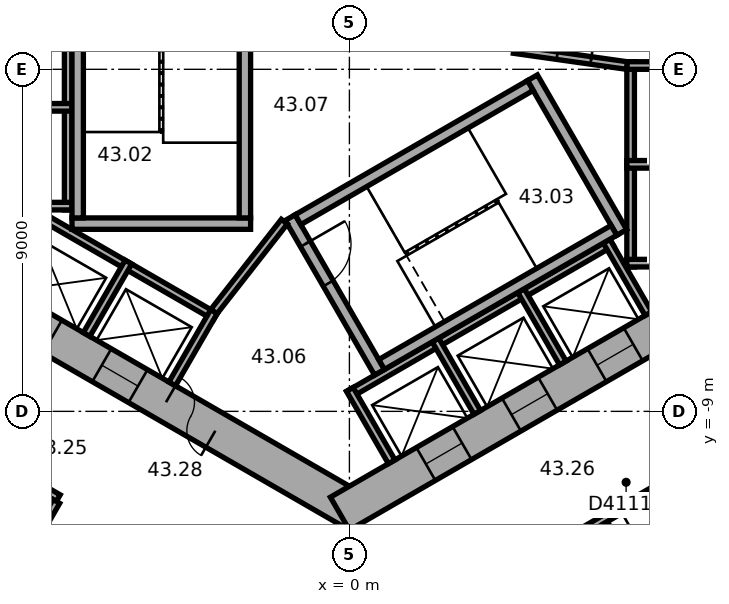
"""IFC4 building model, lengths in metres.
Left out: names, types, materials, properties, quantities, classifications, styles, units other than length and angle.
Written with IfcOpenShell. Run it as: python <this file> out.ifc"""

import sys

from ifc_helpers import new_model, si_unit, direction, frame, frame_2d, origin, place, context, subcontext, project, spatial, rectangle, extrude, element, fill, save


model = new_model("IFC4")
c1 = context("Model", 3, precision=1e-05, world=origin(), true_north=direction((0.0, 1.0)))
c2 = subcontext(c1, "Body", "Model", "MODEL_VIEW")
j1 = project(units=[si_unit("LENGTHUNIT", "METRE"), si_unit("PLANEANGLEUNIT", "RADIAN")], contexts=[c1])
p1 = place(None, origin())
s1 = spatial("IfcSite", under=j1, at=p1, CompositionType="ELEMENT")
p2 = place(p1, origin())
s2 = spatial("IfcBuilding", under=s1, at=p2, CompositionType="ELEMENT")
p3 = place(p2, frame((0.0, 0.0, 176.2)))
s3 = spatial("IfcBuildingStorey", under=s2, at=p3, CompositionType="ELEMENT", Elevation=176.2)
p4 = place(p3, frame((-10.25, -5.629, 0.0), z_axis=(0.0, 0.0, 1.0), x_axis=(0.866022616891, -0.50000482701, 0.0)))
e1 = element("IfcWall", 1, at=p4, inside=s3, PredefinedType="SHEAR", context=c2, shape_type="SweptSolid", body=[
    extrude(rectangle(XDim=12.125, YDim=1.0, at=frame_2d((6.062, 0.0))), origin(), (0.0, 0.0, 1.0), 3.7),
])
p5 = place(p4, frame((6.262, 0.0, 0.0)))
e2 = element("IfcOpeningElement", 2, at=p5, cuts=e1, PredefinedType="OPENING", context=c2, shape_type="SweptSolid", body=[
    extrude(rectangle(XDim=1.5, YDim=2.1, at=frame_2d((0.75, 1.05))), frame((0.0, 0.51, 0.0), z_axis=(0.0, -1.0, 0.0), x_axis=(1.0, 0.0, 0.0)), (0.0, 0.0, 1.0), 1.02),
])
p6 = place(p4, frame((1.712, 0.0, 0.0)))
e3 = element("IfcOpeningElement", 3, at=p6, cuts=e1, PredefinedType="OPENING", context=c2, shape_type="SweptSolid", body=[
    extrude(rectangle(XDim=1.1, YDim=2.1, at=frame_2d((0.55, 1.05))), frame((0.0, 0.51, 0.0), z_axis=(0.0, -1.0, 0.0), x_axis=(1.0, 0.0, 0.0)), (0.0, 0.0, 1.0), 1.02),
])
p7 = place(p4, frame((4.312, 0.0, 0.0)))
e4 = element("IfcOpeningElement", 4, at=p7, cuts=e1, PredefinedType="OPENING", context=c2, shape_type="SweptSolid", body=[
    extrude(rectangle(XDim=1.1, YDim=2.1, at=frame_2d((0.55, 1.05))), frame((0.0, 0.51, 0.0), z_axis=(0.0, -1.0, 0.0), x_axis=(1.0, 0.0, 0.0)), (0.0, 0.0, 1.0), 1.02),
])
p8 = place(p3, frame((-0.25, -11.691, 0.0), z_axis=(0.0, 0.0, 1.0), x_axis=(0.866022616891, 0.50000482701, 0.0)))
e5 = element("IfcWall", 5, at=p8, inside=s3, PredefinedType="SHEAR", context=c2, shape_type="SweptSolid", body=[
    extrude(rectangle(XDim=12.125, YDim=1.0, at=frame_2d((6.062, 0.0))), origin(), (0.0, 0.0, 1.0), 3.7),
])
p9 = place(p8, frame((2.612, 0.0, 0.0)))
e6 = element("IfcOpeningElement", 6, at=p9, cuts=e5, PredefinedType="OPENING", context=c2, shape_type="SweptSolid", body=[
    extrude(rectangle(XDim=1.1, YDim=2.1, at=frame_2d((0.55, 1.05))), frame((0.0, 0.51, 0.0), z_axis=(0.0, -1.0, 0.0), x_axis=(1.0, 0.0, 0.0)), (0.0, 0.0, 1.0), 1.02),
])
p10 = place(p8, frame((5.212, 0.0, 0.0)))
e7 = element("IfcOpeningElement", 7, at=p10, cuts=e5, PredefinedType="OPENING", context=c2, shape_type="SweptSolid", body=[
    extrude(rectangle(XDim=1.1, YDim=2.1, at=frame_2d((0.55, 1.05))), frame((0.0, 0.51, 0.0), z_axis=(0.0, -1.0, 0.0), x_axis=(1.0, 0.0, 0.0)), (0.0, 0.0, 1.0), 1.02),
])
p11 = place(p8, frame((7.812, 0.0, 0.0)))
e8 = element("IfcOpeningElement", 8, at=p11, cuts=e5, PredefinedType="OPENING", context=c2, shape_type="SweptSolid", body=[
    extrude(rectangle(XDim=1.1, YDim=2.1, at=frame_2d((0.55, 1.05))), frame((0.0, 0.51, 0.0), z_axis=(0.0, -1.0, 0.0), x_axis=(1.0, 0.0, 0.0)), (0.0, 0.0, 1.0), 1.02),
])
p12 = place(p3, frame((7.4, -5.2, 0.0), z_axis=(0.0, 0.0, 1.0), x_axis=(0.0, 1.0, 0.0)))
e9 = element("IfcWall", 9, at=p12, inside=s3, PredefinedType="PARTITIONING", context=c2, shape_type="SweptSolid", body=[
    extrude(rectangle(XDim=5.4, YDim=0.2, at=frame_2d((2.7, 0.0))), origin(), (0.0, 0.0, 1.0), 3.42),
])
for number, where, z_axis, x_axis in (
    (10, (7.3, -5.1, 0.0), (0.0, 0.0, 1.0), (1.0, 0.0, 0.0)),
    (11, (7.3, -2.5, 0.0), (0.0, 0.0, 1.0), (1.0, 0.0, 0.0)),
    (12, (7.3, 0.1, 0.0), (0.0, 0.0, 1.0), (1.0, 0.0, 0.0)),
):
    element("IfcWall", number, at=place(p3, frame(where, z_axis=z_axis, x_axis=x_axis)), inside=s3, PredefinedType="PARTITIONING", context=c2, shape_type="SweptSolid", body=[
        extrude(rectangle(XDim=2.2, YDim=0.2, at=frame_2d((1.1, 0.0))), origin(), (0.0, 0.0, 1.0), 3.42),
    ])
p13 = place(p3, frame((-7.4, 4.3, 0.0), z_axis=(0.0, 0.0, 1.0), x_axis=(0.0, -1.0, 0.0)))
e13 = element("IfcWall", 13, at=p13, inside=s3, PredefinedType="PARTITIONING", context=c2, shape_type="SweptSolid", body=[
    extrude(rectangle(XDim=8.0, YDim=0.2, at=frame_2d((4.0, 0.0))), origin(), (0.0, 0.0, 1.0), 3.42),
])
for number, where, z_axis, x_axis in (
    (14, (-7.3, -1.0, 0.0), (0.0, 0.0, 1.0), (-1.0, 0.0, 0.0)),
    (15, (-7.3, -3.6, 0.0), (0.0, 0.0, 1.0), (-1.0, 0.0, 0.0)),
):
    element("IfcWall", number, at=place(p3, frame(where, z_axis=z_axis, x_axis=x_axis)), inside=s3, PredefinedType="PARTITIONING", context=c2, shape_type="SweptSolid", body=[
        extrude(rectangle(XDim=2.2, YDim=0.2, at=frame_2d((1.1, 0.0))), origin(), (0.0, 0.0, 1.0), 3.42),
    ])
p14 = place(p3, frame((-8.203, -3.809, 0.0), z_axis=(0.0, 0.0, 1.0), x_axis=(0.866028230842, -0.499995103361, 0.0)))
e16 = element("IfcWall", 16, at=p14, inside=s3, PredefinedType="PARTITIONING", context=c2, shape_type="SweptSolid", body=[
    extrude(rectangle(XDim=5.4, YDim=0.2, at=frame_2d((2.7, 0.0))), origin(), (0.0, 0.0, 1.0), 3.42),
])
p15 = place(p3, frame((-5.815, -5.072, 0.0), z_axis=(0.0, 0.0, 1.0), x_axis=(-0.499946605688, -0.86605622881, 0.0)))
e17 = element("IfcWall", 17, at=p15, inside=s3, PredefinedType="PARTITIONING", context=c2, shape_type="SweptSolid", body=[
    extrude(rectangle(XDim=2.2, YDim=0.2, at=frame_2d((1.1, 0.0))), origin(), (0.0, 0.0, 1.0), 3.42),
])
p16 = place(p3, frame((-3.563, -6.372, 0.0), z_axis=(0.0, 0.0, 1.0), x_axis=(-0.499994660107, -0.866028486751, 0.0)))
e18 = element("IfcWall", 18, at=p16, inside=s3, PredefinedType="PARTITIONING", context=c2, shape_type="SweptSolid", body=[
    extrude(rectangle(XDim=2.2, YDim=0.2, at=frame_2d((1.1, 0.0))), origin(), (0.0, 0.0, 1.0), 3.42),
])
p17 = place(p3, frame((-0.024, -8.559, 0.0), z_axis=(0.0, 0.0, 1.0), x_axis=(0.866026010844, 0.49999894854, 0.0)))
e19 = element("IfcWall", 19, at=p17, inside=s3, PredefinedType="PARTITIONING", context=c2, shape_type="SweptSolid", body=[
    extrude(rectangle(XDim=8.0, YDim=0.2, at=frame_2d((4.0, 0.0))), origin(), (0.0, 0.0, 1.0), 3.42),
])
for number, where, z_axis, x_axis in (
    (20, (0.013, -8.422, 0.0), (0.0, 0.0, 1.0), (0.5, -0.866, 0.0)),
    (21, (2.264, -7.122, 0.0), (0.0, 0.0, 1.0), (0.5, -0.866, 0.0)),
    (22, (4.516, -5.822, 0.0), (0.0, 0.0, 1.0), (0.5, -0.866, 0.0)),
    (23, (6.768, -4.522, 0.0), (0.0, 0.0, 1.0), (0.5, -0.866, 0.0)),
):
    element("IfcWall", number, at=place(p3, frame(where, z_axis=z_axis, x_axis=x_axis)), inside=s3, PredefinedType="PARTITIONING", context=c2, shape_type="SweptSolid", body=[
        extrude(rectangle(XDim=2.2, YDim=0.2, at=frame_2d((1.1, 0.0))), origin(), (0.0, 0.0, 1.0), 3.42),
    ])
p18 = place(p3, frame((-2.6, -4.06, 0.0), z_axis=(0.0, 0.0, 1.0), x_axis=(-1.0, 0.0, 0.0)))
e24 = element("IfcWall", 24, at=p18, inside=s3, PredefinedType="SHEAR", context=c2, shape_type="SweptSolid", body=[
    extrude(rectangle(XDim=4.7, YDim=0.3, at=frame_2d((2.35, 0.0))), origin(), (0.0, 0.0, 1.0), 3.42),
])
for number, where, z_axis, x_axis in (
    (25, (-2.75, 3.15, 0.0), (0.0, 0.0, 1.0), (0.0, -1.0, 0.0)),
    (26, (-7.15, 3.15, 0.0), (0.0, 0.0, 1.0), (0.0, -1.0, 0.0)),
):
    element("IfcWall", number, at=place(p3, frame(where, z_axis=z_axis, x_axis=x_axis)), inside=s3, PredefinedType="SHEAR", context=c2, shape_type="SweptSolid", body=[
        extrude(rectangle(XDim=7.06, YDim=0.3, at=frame_2d((3.53, 0.0))), origin(), (0.0, 0.0, 1.0), 3.42),
    ])
p19 = place(p3, frame((-1.558, -3.902, 0.0), z_axis=(0.0, 0.0, 1.0), x_axis=(0.499977259774, -0.866038532462, 0.0)))
e27 = element("IfcWall", 27, at=p19, inside=s3, PredefinedType="SHEAR", context=c2, shape_type="SweptSolid", body=[
    extrude(rectangle(XDim=4.7, YDim=0.3, at=frame_2d((2.35, 0.0))), origin(), (0.0, 0.0, 1.0), 3.42),
])
p20 = place(p19, frame((0.8, 0.0, 0.0)))
e28 = element("IfcOpeningElement", 28, at=p20, cuts=e27, PredefinedType="OPENING", context=c2, shape_type="SweptSolid", body=[
    extrude(rectangle(XDim=1.2, YDim=2.1, at=frame_2d((0.6, 1.05))), frame((0.0, 0.16, 0.0), z_axis=(0.0, -1.0, 0.0), x_axis=(1.0, 0.0, 0.0)), (0.0, 0.0, 1.0), 0.32),
])
p21 = place(p3, frame((4.816, -0.222, 0.0), z_axis=(0.0, 0.0, 1.0), x_axis=(0.499977259774, -0.866038532462, 0.0)))
e29 = element("IfcWall", 29, at=p21, inside=s3, PredefinedType="SHEAR", context=c2, shape_type="SweptSolid", body=[
    extrude(rectangle(XDim=4.7, YDim=0.3, at=frame_2d((2.35, 0.0))), origin(), (0.0, 0.0, 1.0), 3.42),
])
for number, where, z_axis, x_axis in (
    (30, (-1.353, -3.957, 0.0), (0.0, 0.0, 1.0), (0.866, 0.5, 0.0)),
    (31, (0.847, -7.767, 0.0), (0.0, 0.0, 1.0), (0.866, 0.5, 0.0)),
):
    element("IfcWall", number, at=place(p3, frame(where, z_axis=z_axis, x_axis=x_axis)), inside=s3, PredefinedType="SHEAR", context=c2, shape_type="SweptSolid", body=[
        extrude(rectangle(XDim=7.06, YDim=0.3, at=frame_2d((3.53, 0.0))), origin(), (0.0, 0.0, 1.0), 3.42),
    ])
p22 = place(p3, frame((4.327, 0.521, 0.0), z_axis=(0.0, 0.0, 1.0), x_axis=(0.990124376366, -0.14019172346, 0.0)))
e32 = element("IfcWall", 32, at=p22, inside=s3, PredefinedType="PARTITIONING", context=c2, shape_type="SweptSolid", body=[
    extrude(rectangle(XDim=3.002, YDim=0.2, at=frame_2d((1.501, 0.0))), origin(), (0.0, 0.0, 1.0), 3.42),
])
p23 = place(p22, frame((1.15, 0.0, 0.0)))
e33 = element("IfcOpeningElement", 33, at=p23, cuts=e32, PredefinedType="OPENING", context=c2, shape_type="SweptSolid", body=[
    extrude(rectangle(XDim=0.9, YDim=2.1, at=frame_2d((0.45, 1.05))), frame((0.0, 0.11, 0.0), z_axis=(0.0, -1.0, 0.0), x_axis=(1.0, 0.0, 0.0)), (0.0, 0.0, 1.0), 0.22),
])
p24 = place(p3, frame((-1.712, -4.008, 0.0), z_axis=(0.0, 0.0, 1.0), x_axis=(-0.616549420702, -0.787316208287, 0.0)))
e34 = element("IfcWall", 34, at=p24, inside=s3, PredefinedType="PARTITIONING", context=c2, shape_type="SweptSolid", body=[
    extrude(rectangle(XDim=3.002, YDim=0.2, at=frame_2d((1.501, 0.0))), origin(), (0.0, 0.0, 1.0), 3.42),
])
p25 = place(p3, frame((-11.435, -9.103, 0.0), z_axis=(0.0, 0.0, 1.0), x_axis=(0.866007399799, -0.500031182522, 0.0)))
e35 = element("IfcWall", 35, at=p25, inside=s3, PredefinedType="PARTITIONING", context=c2, shape_type="SweptSolid", body=[
    extrude(rectangle(XDim=4.358, YDim=0.2, at=frame_2d((2.179, 0.0))), origin(), (0.0, 0.0, 1.0), 3.42),
])
p26 = place(p3, frame((-11.235, -17.474, 0.0), z_axis=(0.0, 0.0, 1.0), x_axis=(0.500009260695, 0.866020057054, 0.0)))
e36 = element("IfcWall", 36, at=p26, inside=s3, PredefinedType="PARTITIONING", context=c2, shape_type="SweptSolid", body=[
    extrude(rectangle(XDim=7.049, YDim=0.2, at=frame_2d((3.524, 0.0))), origin(), (0.0, 0.0, 1.0), 2.87),
])
p27 = place(p26, frame((3.024, 0.0, 0.0)))
e37 = element("IfcOpeningElement", 37, at=p27, cuts=e36, PredefinedType="OPENING", context=c2, shape_type="SweptSolid", body=[
    extrude(rectangle(XDim=1.0, YDim=2.1, at=frame_2d((0.5, 1.05))), frame((0.0, 0.11, 0.0), z_axis=(0.0, -1.0, 0.0), x_axis=(1.0, 0.0, 0.0)), (0.0, 0.0, 1.0), 0.22),
])
p28 = place(p3, frame((4.782, -12.944, 0.0), z_axis=(0.0, 0.0, 1.0), x_axis=(0.866022506829, 0.50000501764, 0.0)))
e38 = element("IfcWall", 38, at=p28, inside=s3, PredefinedType="PARTITIONING", context=c2, shape_type="SweptSolid", body=[
    extrude(rectangle(XDim=6.432, YDim=0.2, at=frame_2d((3.216, 0.0))), origin(), (0.0, 0.0, 1.0), 3.42),
])
p29 = place(p28, frame((2.704, 0.0, 0.0)))
e39 = element("IfcOpeningElement", 39, at=p29, cuts=e38, PredefinedType="OPENING", context=c2, shape_type="SweptSolid", body=[
    extrude(rectangle(XDim=1.0, YDim=2.1, at=frame_2d((0.5, 1.05))), frame((0.0, 0.11, 0.0), z_axis=(0.0, -1.0, 0.0), x_axis=(1.0, 0.0, 0.0)), (0.0, 0.0, 1.0), 0.22),
])
p30 = place(p28, frame((4.795, 0.0, 0.0)))
e40 = element("IfcOpeningElement", 40, at=p30, cuts=e38, PredefinedType="OPENING", context=c2, shape_type="SweptSolid", body=[
    extrude(rectangle(XDim=1.0, YDim=2.1, at=frame_2d((0.5, 1.05))), frame((0.0, 0.11, 0.0), z_axis=(0.0, -1.0, 0.0), x_axis=(1.0, 0.0, 0.0)), (0.0, 0.0, 1.0), 0.22),
])
p31 = place(p3, frame((6.737, -11.931, 0.0), z_axis=(0.0, 0.0, 1.0), x_axis=(0.500004234368, -0.866022959057, 0.0)))
e41 = element("IfcWall", 41, at=p31, inside=s3, PredefinedType="PARTITIONING", context=c2, shape_type="SweptSolid", body=[
    extrude(rectangle(XDim=2.5, YDim=0.12, at=frame_2d((1.25, 0.0))), origin(), (0.0, 0.0, 1.0), 3.42),
])
p32 = place(p31, frame((0.8, 0.0, 0.0)))
e42 = element("IfcOpeningElement", 42, at=p32, cuts=e41, PredefinedType="OPENING", context=c2, shape_type="SweptSolid", body=[
    extrude(rectangle(XDim=0.9, YDim=2.1, at=frame_2d((0.45, 1.05))), frame((0.0, 0.07, 0.0), z_axis=(0.0, -1.0, 0.0), x_axis=(1.0, 0.0, 0.0)), (0.0, 0.0, 1.0), 0.14),
])
p33 = place(p5, origin())
e43 = element("IfcDoor", 43, at=p33, inside=s3, OperationType="DOUBLE_DOOR_SINGLE_SWING", PredefinedType="DOOR", context=c2, shape_type="SweptSolid", body=[
    extrude(rectangle(XDim=1.5, YDim=2.1, at=frame_2d((0.75, 1.05))), frame((0.0, 0.025, 0.0), z_axis=(0.0, -1.0, 0.0), x_axis=(1.0, 0.0, 0.0)), (0.0, 0.0, 1.0), 0.05),
])
fill(e2, e43)
p34 = place(p20, origin())
e44 = element("IfcDoor", 44, at=p34, inside=s3, OperationType="SINGLE_SWING_RIGHT", PredefinedType="DOOR", context=c2, shape_type="SweptSolid", body=[
    extrude(rectangle(XDim=1.2, YDim=2.1, at=frame_2d((0.6, 1.05))), frame((0.0, 0.025, 0.0), z_axis=(0.0, -1.0, 0.0), x_axis=(1.0, 0.0, 0.0)), (0.0, 0.0, 1.0), 0.05),
])
fill(e28, e44)
p35 = place(p23, origin())
e45 = element("IfcDoor", 45, at=p35, inside=s3, OperationType="SINGLE_SWING_LEFT", PredefinedType="DOOR", context=c2, shape_type="SweptSolid", body=[
    extrude(rectangle(XDim=0.9, YDim=2.1, at=frame_2d((0.45, 1.05))), frame((0.0, 0.025, 0.0), z_axis=(0.0, -1.0, 0.0), x_axis=(1.0, 0.0, 0.0)), (0.0, 0.0, 1.0), 0.05),
])
fill(e33, e45)
p36 = place(p6, origin())
e46 = element("IfcDoor", 46, at=p36, inside=s3, OperationType="DOUBLE_DOOR_SLIDING", PredefinedType="DOOR", context=c2, shape_type="SweptSolid", body=[
    extrude(rectangle(XDim=1.1, YDim=2.1, at=frame_2d((0.55, 1.05))), frame((0.0, 0.025, 0.0), z_axis=(0.0, -1.0, 0.0), x_axis=(1.0, 0.0, 0.0)), (0.0, 0.0, 1.0), 0.05),
])
fill(e3, e46)
p37 = place(p7, origin())
e47 = element("IfcDoor", 47, at=p37, inside=s3, OperationType="DOUBLE_DOOR_SLIDING", PredefinedType="DOOR", context=c2, shape_type="SweptSolid", body=[
    extrude(rectangle(XDim=1.1, YDim=2.1, at=frame_2d((0.55, 1.05))), frame((0.0, 0.025, 0.0), z_axis=(0.0, -1.0, 0.0), x_axis=(1.0, 0.0, 0.0)), (0.0, 0.0, 1.0), 0.05),
])
fill(e4, e47)
p38 = place(p9, origin())
e48 = element("IfcDoor", 48, at=p38, inside=s3, OperationType="DOUBLE_DOOR_SLIDING", PredefinedType="DOOR", context=c2, shape_type="SweptSolid", body=[
    extrude(rectangle(XDim=1.1, YDim=2.1, at=frame_2d((0.55, 1.05))), frame((0.0, 0.025, 0.0), z_axis=(0.0, -1.0, 0.0), x_axis=(1.0, 0.0, 0.0)), (0.0, 0.0, 1.0), 0.05),
])
fill(e6, e48)
p39 = place(p10, origin())
e49 = element("IfcDoor", 49, at=p39, inside=s3, OperationType="DOUBLE_DOOR_SLIDING", PredefinedType="DOOR", context=c2, shape_type="SweptSolid", body=[
    extrude(rectangle(XDim=1.1, YDim=2.1, at=frame_2d((0.55, 1.05))), frame((0.0, 0.025, 0.0), z_axis=(0.0, -1.0, 0.0), x_axis=(1.0, 0.0, 0.0)), (0.0, 0.0, 1.0), 0.05),
])
fill(e7, e49)
p40 = place(p11, origin())
e50 = element("IfcDoor", 50, at=p40, inside=s3, OperationType="DOUBLE_DOOR_SLIDING", PredefinedType="DOOR", context=c2, shape_type="SweptSolid", body=[
    extrude(rectangle(XDim=1.1, YDim=2.1, at=frame_2d((0.55, 1.05))), frame((0.0, 0.025, 0.0), z_axis=(0.0, -1.0, 0.0), x_axis=(1.0, 0.0, 0.0)), (0.0, 0.0, 1.0), 0.05),
])
fill(e8, e50)
p41 = place(p29, origin())
e51 = element("IfcDoor", 51, at=p41, inside=s3, OperationType="SINGLE_SWING_LEFT", PredefinedType="DOOR", context=c2, shape_type="SweptSolid", body=[
    extrude(rectangle(XDim=1.0, YDim=2.1, at=frame_2d((0.5, 1.05))), frame((0.0, 0.025, 0.0), z_axis=(0.0, -1.0, 0.0), x_axis=(1.0, 0.0, 0.0)), (0.0, 0.0, 1.0), 0.05),
])
fill(e39, e51)
save(model, sys.argv[1])
